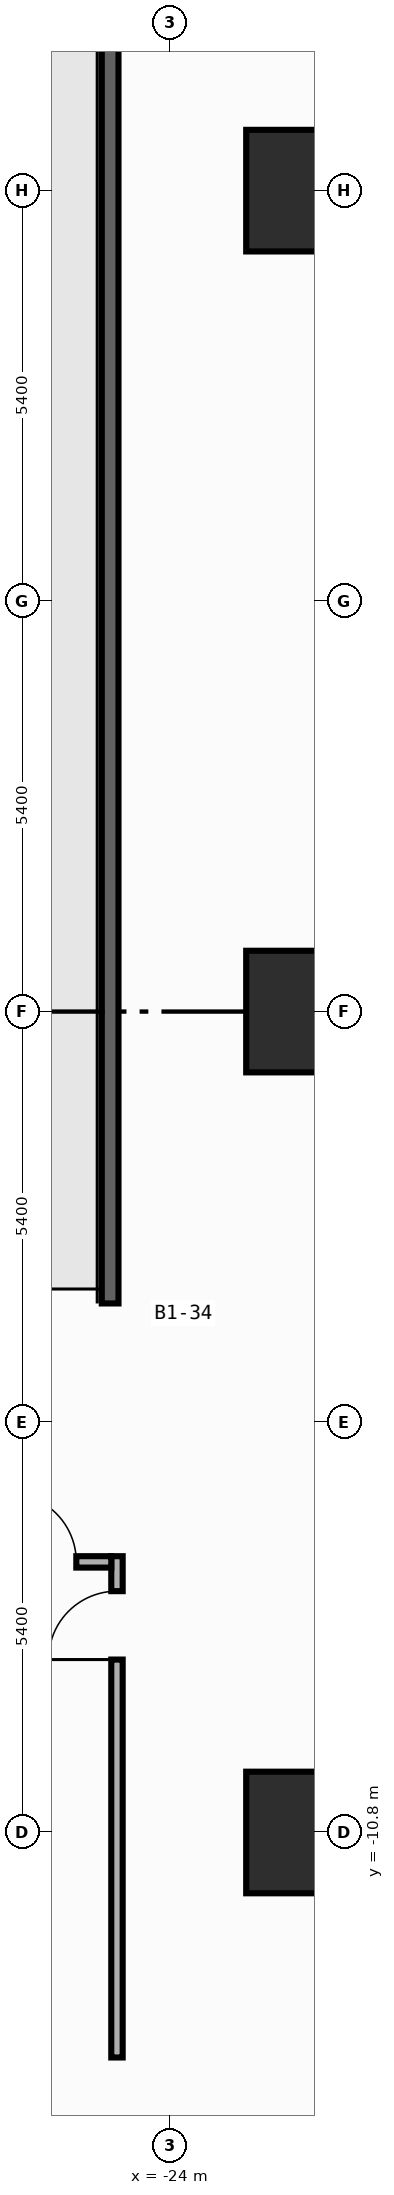
"""IFC4 building model, lengths in metres.
Left out: names, types, materials, properties, quantities, classifications, styles, units other than length and angle.
Written with IfcOpenShell. Run it as: python <this file> out.ifc"""

import sys

from ifc_helpers import new_model, si_unit, direction, frame, frame_2d, origin, origin_2d, place, context, subcontext, project, spatial, polyline, rectangle, outline, extrude, element, fill, save


model = new_model("IFC4")
c1 = context("Model", 3, precision=1e-05, world=origin(), true_north=direction((0.0, 1.0)))
c2 = subcontext(c1, "Body", "Model", "MODEL_VIEW")
j1 = project(units=[si_unit("LENGTHUNIT", "METRE"), si_unit("PLANEANGLEUNIT", "RADIAN")], contexts=[c1])
p1 = place(None, origin())
s1 = spatial("IfcSite", under=j1, at=p1, CompositionType="ELEMENT")
p2 = place(p1, origin())
s2 = spatial("IfcBuilding", under=s1, at=p2, CompositionType="ELEMENT")
p3 = place(p2, frame((0.0, 0.0, -4.5)))
s3 = spatial("IfcBuildingStorey", under=s2, at=p3, CompositionType="ELEMENT", Elevation=-4.5)
for number, where, z_axis, x_axis in (
    (1, (-22.2, -10.8, 0.0), (0.0, 0.0, 1.0), (1.0, 0.0, 0.0)),
    (2, (-22.2, 0.0, 0.0), (0.0, 0.0, 1.0), (1.0, 0.0, 0.0)),
    (3, (-22.2, 10.8, 0.0), (0.0, 0.0, 1.0), (1.0, 0.0, 0.0)),
):
    element("IfcColumn", number, at=place(p3, frame(where, z_axis=z_axis, x_axis=x_axis)), inside=s3, PredefinedType="COLUMN", context=c2, shape_type="SweptSolid", body=[
        extrude(rectangle(XDim=1.6, YDim=1.6, at=origin_2d()), origin(), (0.0, 0.0, 1.0), 4.5),
    ])
p4 = place(p3, frame((-24.79, -3.84, 0.0), z_axis=(0.0, 0.0, 1.0), x_axis=(0.0, 1.0, 0.0)))
e4 = element("IfcWall", 4, at=p4, inside=s3, PredefinedType="SHEAR", context=c2, shape_type="SweptSolid", body=[
    extrude(outline(polyline([(0.0, 0.0), (30.18, 0.0), (30.18, 4.2), (0.0, 0.02), (0.0, 0.0)])), frame((0.0, 0.11, 0.0), z_axis=(0.0, -1.0, 0.0), x_axis=(1.0, 0.0, 0.0)), (0.0, 0.0, 1.0), 0.22),
])
p5 = place(p3, frame((-24.7, -13.76, 0.0), z_axis=(0.0, 0.0, 1.0), x_axis=(0.0, 1.0, 0.0)))
e5 = element("IfcWall", 5, at=p5, inside=s3, PredefinedType="PARTITIONING", context=c2, shape_type="SweptSolid", body=[
    extrude(rectangle(XDim=6.595, YDim=0.15, at=frame_2d((3.297, 0.0))), origin(), (0.0, 0.0, 1.0), 4.2),
])
p6 = place(p5, frame((5.235, 0.0, 0.0)))
e6 = element("IfcOpeningElement", 6, at=p6, cuts=e5, PredefinedType="OPENING", context=c2, shape_type="SweptSolid", body=[
    extrude(rectangle(XDim=0.9, YDim=2.15, at=frame_2d((0.45, 1.075))), frame((0.0, 0.085, 0.0), z_axis=(0.0, -1.0, 0.0), x_axis=(1.0, 0.0, 0.0)), (0.0, 0.0, 1.0), 0.17),
])
p7 = place(p3, frame((-30.04, -7.24, 0.0), z_axis=(0.0, 0.0, 1.0), x_axis=(1.0, 0.0, 0.0)))
e7 = element("IfcWall", 7, at=p7, inside=s3, PredefinedType="PARTITIONING", context=c2, shape_type="SweptSolid", body=[
    extrude(rectangle(XDim=5.265, YDim=0.15, at=frame_2d((2.633, 0.0))), origin(), (0.0, 0.0, 1.0), 4.2),
])
p8 = place(p7, frame((3.905, 0.0, 0.0)))
e8 = element("IfcOpeningElement", 8, at=p8, cuts=e7, PredefinedType="OPENING", context=c2, shape_type="SweptSolid", body=[
    extrude(rectangle(XDim=0.9, YDim=2.15, at=frame_2d((0.45, 1.075))), frame((0.0, 0.085, 0.0), z_axis=(0.0, -1.0, 0.0), x_axis=(1.0, 0.0, 0.0)), (0.0, 0.0, 1.0), 0.17),
])
p9 = place(p6, origin())
e9 = element("IfcDoor", 9, at=p9, inside=s3, OperationType="SINGLE_SWING_LEFT", PredefinedType="DOOR", context=c2, shape_type="SweptSolid", body=[
    extrude(rectangle(XDim=0.9, YDim=2.15, at=frame_2d((0.45, 1.075))), frame((0.0, 0.025, 0.0), z_axis=(0.0, -1.0, 0.0), x_axis=(1.0, 0.0, 0.0)), (0.0, 0.0, 1.0), 0.05),
])
fill(e6, e9)
p10 = place(p8, origin())
e10 = element("IfcDoor", 10, at=p10, inside=s3, OperationType="SINGLE_SWING_LEFT", PredefinedType="DOOR", context=c2, shape_type="SweptSolid", body=[
    extrude(rectangle(XDim=0.9, YDim=2.15, at=frame_2d((0.45, 1.075))), frame((0.0, 0.025, 0.0), z_axis=(0.0, -1.0, 0.0), x_axis=(1.0, 0.0, 0.0)), (0.0, 0.0, 1.0), 0.05),
])
fill(e8, e10)
save(model, sys.argv[1])
